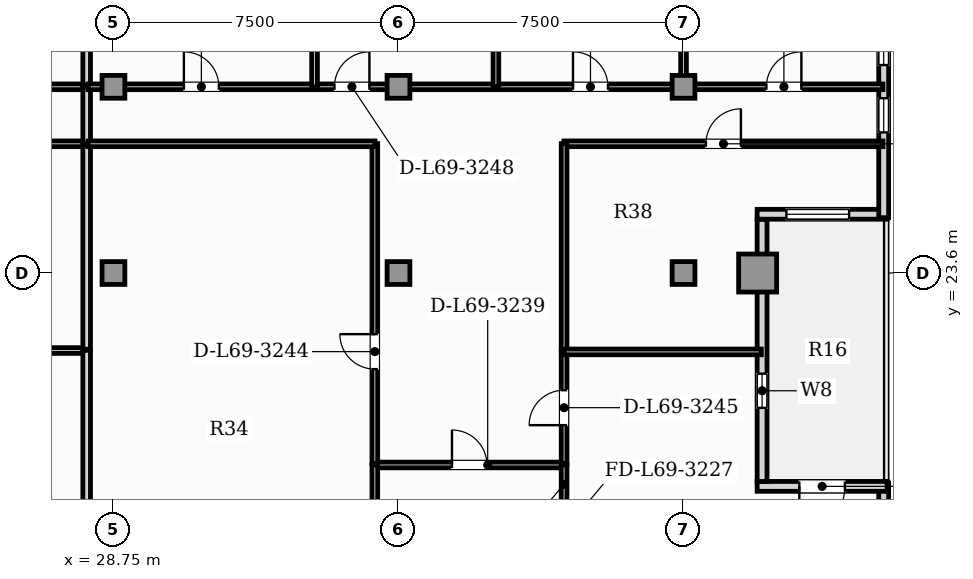
"""IFC4 building model, lengths in metres.
Left out: names, types, materials, properties, quantities, classifications, styles, units other than length and angle.
Written with IfcOpenShell. Run it as: python <this file> out.ifc"""

import sys

from ifc_helpers import new_model, si_unit, direction, frame, frame_2d, origin, origin_2d, place, context, subcontext, project, spatial, rectangle, hollow_rectangle, extrude, element, fill, save


model = new_model("IFC4")
c1 = context("Model", 3, precision=1e-05, world=origin(), true_north=direction((0.0, 1.0)))
c2 = subcontext(c1, "Body", "Model", "MODEL_VIEW")
j1 = project(units=[si_unit("LENGTHUNIT", "METRE"), si_unit("PLANEANGLEUNIT", "RADIAN")], contexts=[c1])
p1 = place(None, origin())
s1 = spatial("IfcSite", under=j1, at=p1, CompositionType="ELEMENT")
p2 = place(p1, origin())
s2 = spatial("IfcBuilding", under=s1, at=p2, CompositionType="ELEMENT")
p3 = place(p2, frame((0.0, 0.0, 281.05)))
s3 = spatial("IfcBuildingStorey", under=s2, at=p3, CompositionType="ELEMENT", Elevation=281.05)
p4 = place(p3, frame((45.7, 23.6, 0.0), z_axis=(0.0, 0.0, 1.0), x_axis=(1.0, 0.0, 0.0)))
e1 = element("IfcColumn", 1, at=p4, inside=s3, PredefinedType="USERDEFINED", context=c2, shape_type="SweptSolid", body=[
    extrude(hollow_rectangle(XDim=1.0, YDim=1.0, WallThickness=0.06, at=origin_2d()), origin(), (0.0, 0.0, 1.0), 3.85),
])
for number, where, z_axis, x_axis in (
    (2, (28.75, 23.6, 0.0), (0.0, 0.0, 1.0), (1.0, 0.0, 0.0)),
    (3, (36.25, 23.6, 0.0), (0.0, 0.0, 1.0), (1.0, 0.0, 0.0)),
    (4, (43.75, 23.6, 0.0), (0.0, 0.0, 1.0), (1.0, 0.0, 0.0)),
    (5, (28.75, 28.5, 0.0), (0.0, 0.0, 1.0), (1.0, 0.0, 0.0)),
    (6, (36.25, 28.5, 0.0), (0.0, 0.0, 1.0), (1.0, 0.0, 0.0)),
    (7, (43.75, 28.5, 0.0), (0.0, 0.0, 1.0), (1.0, 0.0, 0.0)),
):
    element("IfcColumn", number, at=place(p3, frame(where, z_axis=z_axis, x_axis=x_axis)), inside=s3, PredefinedType="COLUMN", context=c2, shape_type="SweptSolid", body=[
        extrude(rectangle(XDim=0.6, YDim=0.6, at=origin_2d()), origin(), (0.0, 0.0, 1.0), 3.85),
    ])
p5 = place(p3, frame((49.017, 3.24, 0.0), z_axis=(0.0, 0.0, 1.0), x_axis=(0.0, 1.0, 0.0)))
e8 = element("IfcWall", 8, at=p5, inside=s3, PredefinedType="SOLIDWALL", context=c2, shape_type="SweptSolid", body=[
    extrude(rectangle(XDim=14.836, YDim=0.26, at=frame_2d((7.418, 0.0))), origin(), (0.0, 0.0, 1.0), 3.65),
])
p6 = place(p3, frame((49.107, 17.986, 0.0), z_axis=(0.0, 0.0, 1.0), x_axis=(-1.0, 0.0, 0.0)))
e9 = element("IfcWall", 9, at=p6, inside=s3, PredefinedType="SOLIDWALL", context=c2, shape_type="SweptSolid", body=[
    extrude(rectangle(XDim=3.42, YDim=0.26, at=frame_2d((1.71, 0.0))), origin(), (0.0, 0.0, 1.0), 3.65),
])
p7 = place(p6, frame((1.11, 0.0, 0.0)))
e10 = element("IfcOpeningElement", 10, at=p7, cuts=e9, PredefinedType="OPENING", context=c2, shape_type="SweptSolid", body=[
    extrude(rectangle(XDim=1.2, YDim=2.2, at=frame_2d((0.6, 1.1))), frame((0.0, 0.14, 0.0), z_axis=(0.0, -1.0, 0.0), x_axis=(1.0, 0.0, 0.0)), (0.0, 0.0, 1.0), 0.28),
])
p8 = place(p3, frame((45.817, 18.116, 0.0), z_axis=(0.0, 0.0, 1.0), x_axis=(0.0, 1.0, 0.0)))
e11 = element("IfcWall", 11, at=p8, inside=s3, PredefinedType="SOLIDWALL", context=c2, shape_type="SweptSolid", body=[
    extrude(rectangle(XDim=6.9, YDim=0.26, at=frame_2d((3.45, 0.0))), origin(), (0.0, 0.0, 1.0), 3.19),
])
p9 = place(p8, frame((1.936, 0.0, 0.85)))
e12 = element("IfcOpeningElement", 12, at=p9, cuts=e11, PredefinedType="OPENING", context=c2, shape_type="SweptSolid", body=[
    extrude(rectangle(XDim=0.9, YDim=1.4, at=frame_2d((0.45, 0.7))), frame((0.0, 0.14, 0.0), z_axis=(0.0, -1.0, 0.0), x_axis=(1.0, 0.0, 0.0)), (0.0, 0.0, 1.0), 0.28),
])
p10 = place(p3, frame((45.687, 25.146, 0.0), z_axis=(0.0, 0.0, 1.0), x_axis=(1.0, 0.0, 0.0)))
e13 = element("IfcWall", 13, at=p10, inside=s3, PredefinedType="SOLIDWALL", context=c2, shape_type="SweptSolid", body=[
    extrude(rectangle(XDim=3.42, YDim=0.26, at=frame_2d((1.71, 0.0))), origin(), (0.0, 0.0, 1.0), 3.65),
])
p11 = place(p10, frame((0.77, 0.0, 0.88)))
e14 = element("IfcOpeningElement", 14, at=p11, cuts=e13, PredefinedType="OPENING", context=c2, shape_type="SweptSolid", body=[
    extrude(rectangle(XDim=1.65, YDim=2.0, at=frame_2d((0.825, 1.0))), frame((0.0, 0.14, 0.0), z_axis=(0.0, -1.0, 0.0), x_axis=(1.0, 0.0, 0.0)), (0.0, 0.0, 1.0), 0.28),
])
p12 = place(p3, frame((49.017, 25.056, 0.0), z_axis=(0.0, 0.0, 1.0), x_axis=(0.0, 1.0, 0.0)))
e15 = element("IfcWall", 15, at=p12, inside=s3, PredefinedType="SOLIDWALL", context=c2, shape_type="SweptSolid", body=[
    extrude(rectangle(XDim=6.436, YDim=0.26, at=frame_2d((3.218, 0.0))), origin(), (0.0, 0.0, 1.0), 3.65),
])
p13 = place(p12, frame((2.244, 0.0, 0.95)))
e16 = element("IfcOpeningElement", 16, at=p13, cuts=e15, PredefinedType="OPENING", context=c2, shape_type="SweptSolid", body=[
    extrude(rectangle(XDim=0.9, YDim=1.5, at=frame_2d((0.45, 0.75))), frame((0.0, 0.14, 0.0), z_axis=(0.0, -1.0, 0.0), x_axis=(1.0, 0.0, 0.0)), (0.0, 0.0, 1.0), 0.28),
])
p14 = place(p12, frame((4.016, 0.0, 0.88)))
e17 = element("IfcOpeningElement", 17, at=p14, cuts=e15, PredefinedType="OPENING", context=c2, shape_type="SweptSolid", body=[
    extrude(rectangle(XDim=1.65, YDim=2.0, at=frame_2d((0.825, 1.0))), frame((0.0, 0.14, 0.0), z_axis=(0.0, -1.0, 0.0), x_axis=(1.0, 0.0, 0.0)), (0.0, 0.0, 1.0), 0.28),
])
p15 = place(p3, frame((21.079, 27.0, 0.0), z_axis=(0.0, 0.0, 1.0), x_axis=(1.0, 0.0, 0.0)))
e18 = element("IfcWall", 18, at=p15, inside=s3, PredefinedType="PARTITIONING", context=c2, shape_type="SweptSolid", body=[
    extrude(rectangle(XDim=6.971, YDim=0.15, at=frame_2d((3.485, 0.0))), origin(), (0.0, 0.0, 1.0), 3.65),
])
p16 = place(p15, frame((3.025, 0.0, 0.0)))
e19 = element("IfcOpeningElement", 19, at=p16, cuts=e18, PredefinedType="OPENING", context=c2, shape_type="SweptSolid", body=[
    extrude(rectangle(XDim=0.92, YDim=2.1, at=frame_2d((0.46, 1.05))), frame((0.0, 0.085, 0.0), z_axis=(0.0, -1.0, 0.0), x_axis=(1.0, 0.0, 0.0)), (0.0, 0.0, 1.0), 0.17),
])
p17 = place(p3, frame((22.545, 28.5, 0.0), z_axis=(0.0, 0.0, 1.0), x_axis=(1.0, 0.0, 0.0)))
e20 = element("IfcWall", 20, at=p17, inside=s3, PredefinedType="PARTITIONING", context=c2, shape_type="SweptSolid", body=[
    extrude(rectangle(XDim=5.506, YDim=0.15, at=frame_2d((2.753, 0.0))), origin(), (0.0, 0.0, 1.0), 3.117),
])
p18 = place(p17, frame((2.293, 0.0, 0.0)))
e21 = element("IfcOpeningElement", 21, at=p18, cuts=e20, PredefinedType="OPENING", context=c2, shape_type="SweptSolid", body=[
    extrude(rectangle(XDim=0.92, YDim=2.1, at=frame_2d((0.46, 1.05))), frame((0.0, 0.085, 0.0), z_axis=(0.0, -1.0, 0.0), x_axis=(1.0, 0.0, 0.0)), (0.0, 0.0, 1.0), 0.17),
])
p19 = place(p3, frame((28.045, 26.995, 0.0), z_axis=(0.0, 0.0, 1.0), x_axis=(0.0, 1.0, 0.0)))
e22 = element("IfcWall", 22, at=p19, inside=s3, PredefinedType="PARTITIONING", context=c2, shape_type="SweptSolid", body=[
    extrude(rectangle(XDim=1.51, YDim=0.2, at=frame_2d((0.755, 0.0))), origin(), (0.0, 0.0, 1.0), 3.65),
])
p20 = place(p3, frame((21.079, 21.561, 0.0), z_axis=(0.0, 0.0, 1.0), x_axis=(1.0, 0.0, 0.0)))
e23 = element("IfcWall", 23, at=p20, inside=s3, PredefinedType="PARTITIONING", context=c2, shape_type="SweptSolid", body=[
    extrude(rectangle(XDim=6.971, YDim=0.15, at=frame_2d((3.485, 0.0))), origin(), (0.0, 0.0, 1.0), 3.65),
])
p21 = place(p3, frame((28.045, 17.525, 0.0), z_axis=(0.0, 0.0, 1.0), x_axis=(0.0, 1.0, 0.0)))
e24 = element("IfcWall", 24, at=p21, inside=s3, PredefinedType="PARTITIONING", context=c2, shape_type="SweptSolid", body=[
    extrude(rectangle(XDim=4.041, YDim=0.2, at=frame_2d((2.021, 0.0))), origin(), (0.0, 0.0, 1.0), 3.65),
])
p22 = place(p3, frame((28.045, 21.596, 0.0), z_axis=(0.0, 0.0, 1.0), x_axis=(0.0, 1.0, 0.0)))
e25 = element("IfcWall", 25, at=p22, inside=s3, PredefinedType="PARTITIONING", context=c2, shape_type="SweptSolid", body=[
    extrude(rectangle(XDim=5.369, YDim=0.2, at=frame_2d((2.685, 0.0))), origin(), (0.0, 0.0, 1.0), 3.65),
])
p23 = place(p3, frame((28.045, 28.535, 0.0), z_axis=(0.0, 0.0, 1.0), x_axis=(0.0, 1.0, 0.0)))
e26 = element("IfcWall", 26, at=p23, inside=s3, PredefinedType="PARTITIONING", context=c2, shape_type="SweptSolid", body=[
    extrude(rectangle(XDim=6.048, YDim=0.2, at=frame_2d((3.024, 0.0))), origin(), (0.0, 0.0, 1.0), 3.65),
])
p24 = place(p3, frame((35.622, 18.55, 0.0), z_axis=(0.0, 0.0, 1.0), x_axis=(1.0, 0.0, 0.0)))
e27 = element("IfcWall", 27, at=p24, inside=s3, PredefinedType="PARTITIONING", context=c2, shape_type="SweptSolid", body=[
    extrude(rectangle(XDim=4.99, YDim=0.15, at=frame_2d((2.495, 0.0))), origin(), (0.0, 0.0, 1.0), 3.65),
])
p25 = place(p24, frame((2.035, 0.0, 0.0)))
e28 = element("IfcOpeningElement", 28, at=p25, cuts=e27, PredefinedType="OPENING", context=c2, shape_type="SweptSolid", body=[
    extrude(rectangle(XDim=0.92, YDim=2.1, at=frame_2d((0.46, 1.05))), frame((0.0, 0.085, 0.0), z_axis=(0.0, -1.0, 0.0), x_axis=(1.0, 0.0, 0.0)), (0.0, 0.0, 1.0), 0.17),
])
p26 = place(p3, frame((35.627, 15.695, 0.0), z_axis=(0.0, 0.0, 1.0), x_axis=(0.0, 1.0, 0.0)))
e29 = element("IfcWall", 29, at=p26, inside=s3, PredefinedType="PARTITIONING", context=c2, shape_type="SweptSolid", body=[
    extrude(rectangle(XDim=2.859, YDim=0.15, at=frame_2d((1.43, 0.0))), origin(), (0.0, 0.0, 1.0), 3.65),
])
p27 = place(p26, frame((0.97, 0.0, 0.0)))
e30 = element("IfcOpeningElement", 30, at=p27, cuts=e29, PredefinedType="OPENING", context=c2, shape_type="SweptSolid", body=[
    extrude(rectangle(XDim=0.92, YDim=2.1, at=frame_2d((0.46, 1.05))), frame((0.0, 0.085, 0.0), z_axis=(0.0, -1.0, 0.0), x_axis=(1.0, 0.0, 0.0)), (0.0, 0.0, 1.0), 0.17),
])
p28 = place(p3, frame((40.607, 17.525, 0.0), z_axis=(0.0, 0.0, 1.0), x_axis=(0.0, 1.0, 0.0)))
e31 = element("IfcWall", 31, at=p28, inside=s3, PredefinedType="PARTITIONING", context=c2, shape_type="SweptSolid", body=[
    extrude(rectangle(XDim=1.03, YDim=0.15, at=frame_2d((0.515, 0.0))), origin(), (0.0, 0.0, 1.0), 3.65),
])
p29 = place(p3, frame((35.627, 18.584, 0.0), z_axis=(0.0, 0.0, 1.0), x_axis=(0.0, 1.0, 0.0)))
e32 = element("IfcWall", 32, at=p29, inside=s3, PredefinedType="PARTITIONING", context=c2, shape_type="SweptSolid", body=[
    extrude(rectangle(XDim=8.42, YDim=0.15, at=frame_2d((4.21, 0.0))), origin(), (0.0, 0.0, 1.0), 3.65),
])
p30 = place(p29, frame((2.487, 0.0, 0.0)))
e33 = element("IfcOpeningElement", 33, at=p30, cuts=e32, PredefinedType="OPENING", context=c2, shape_type="SweptSolid", body=[
    extrude(rectangle(XDim=0.92, YDim=2.1, at=frame_2d((0.46, 1.05))), frame((0.0, 0.085, 0.0), z_axis=(0.0, -1.0, 0.0), x_axis=(1.0, 0.0, 0.0)), (0.0, 0.0, 1.0), 0.17),
])
p31 = place(p3, frame((28.08, 27.0, 0.0), z_axis=(0.0, 0.0, 1.0), x_axis=(1.0, 0.0, 0.0)))
e34 = element("IfcWall", 34, at=p31, inside=s3, PredefinedType="PARTITIONING", context=c2, shape_type="SweptSolid", body=[
    extrude(rectangle(XDim=7.552, YDim=0.15, at=frame_2d((3.776, 0.0))), origin(), (0.0, 0.0, 1.0), 3.65),
])
p32 = place(p3, frame((40.607, 18.584, 0.0), z_axis=(0.0, 0.0, 1.0), x_axis=(0.0, 1.0, 0.0)))
e35 = element("IfcWall", 35, at=p32, inside=s3, PredefinedType="PARTITIONING", context=c2, shape_type="SweptSolid", body=[
    extrude(rectangle(XDim=2.945, YDim=0.15, at=frame_2d((1.473, 0.0))), origin(), (0.0, 0.0, 1.0), 3.65),
])
p33 = place(p32, frame((1.012, 0.0, 0.0)))
e36 = element("IfcOpeningElement", 36, at=p33, cuts=e35, PredefinedType="OPENING", context=c2, shape_type="SweptSolid", body=[
    extrude(rectangle(XDim=0.92, YDim=2.1, at=frame_2d((0.46, 1.05))), frame((0.0, 0.085, 0.0), z_axis=(0.0, -1.0, 0.0), x_axis=(1.0, 0.0, 0.0)), (0.0, 0.0, 1.0), 0.17),
])
p34 = place(p3, frame((40.602, 27.0, 0.0), z_axis=(0.0, 0.0, 1.0), x_axis=(1.0, 0.0, 0.0)))
e37 = element("IfcWall", 37, at=p34, inside=s3, PredefinedType="PARTITIONING", context=c2, shape_type="SweptSolid", body=[
    extrude(rectangle(XDim=8.395, YDim=0.15, at=frame_2d((4.198, 0.0))), origin(), (0.0, 0.0, 1.0), 3.65),
])
p35 = place(p34, frame((3.738, 0.0, 0.0)))
e38 = element("IfcOpeningElement", 38, at=p35, cuts=e37, PredefinedType="OPENING", context=c2, shape_type="SweptSolid", body=[
    extrude(rectangle(XDim=0.92, YDim=2.1, at=frame_2d((0.46, 1.05))), frame((0.0, 0.085, 0.0), z_axis=(0.0, -1.0, 0.0), x_axis=(1.0, 0.0, 0.0)), (0.0, 0.0, 1.0), 0.17),
])
p36 = place(p3, frame((40.607, 21.56, 0.0), z_axis=(0.0, 0.0, 1.0), x_axis=(0.0, 1.0, 0.0)))
e39 = element("IfcWall", 39, at=p36, inside=s3, PredefinedType="PARTITIONING", context=c2, shape_type="SweptSolid", body=[
    extrude(rectangle(XDim=5.445, YDim=0.15, at=frame_2d((2.723, 0.0))), origin(), (0.0, 0.0, 1.0), 3.65),
])
p37 = place(p3, frame((28.08, 28.5, 0.0), z_axis=(0.0, 0.0, 1.0), x_axis=(1.0, 0.0, 0.0)))
e40 = element("IfcWall", 40, at=p37, inside=s3, PredefinedType="PARTITIONING", context=c2, shape_type="SweptSolid", body=[
    extrude(rectangle(XDim=5.966, YDim=0.15, at=frame_2d((2.983, 0.0))), origin(), (0.0, 0.0, 1.0), 3.117),
])
p38 = place(p37, frame((2.523, 0.0, 0.0)))
e41 = element("IfcOpeningElement", 41, at=p38, cuts=e40, PredefinedType="OPENING", context=c2, shape_type="SweptSolid", body=[
    extrude(rectangle(XDim=0.92, YDim=2.1, at=frame_2d((0.46, 1.05))), frame((0.0, 0.085, 0.0), z_axis=(0.0, -1.0, 0.0), x_axis=(1.0, 0.0, 0.0)), (0.0, 0.0, 1.0), 0.17),
])
p39 = place(p3, frame((34.077, 28.5, 0.0), z_axis=(0.0, 0.0, 1.0), x_axis=(1.0, 0.0, 0.0)))
e42 = element("IfcWall", 42, at=p39, inside=s3, PredefinedType="PARTITIONING", context=c2, shape_type="SweptSolid", body=[
    extrude(rectangle(XDim=4.742, YDim=0.15, at=frame_2d((2.371, 0.0))), origin(), (0.0, 0.0, 1.0), 3.117),
])
p40 = place(p39, frame((0.488, 0.0, 0.0)))
e43 = element("IfcOpeningElement", 43, at=p40, cuts=e42, PredefinedType="OPENING", context=c2, shape_type="SweptSolid", body=[
    extrude(rectangle(XDim=0.92, YDim=2.1, at=frame_2d((0.46, 1.05))), frame((0.0, 0.085, 0.0), z_axis=(0.0, -1.0, 0.0), x_axis=(1.0, 0.0, 0.0)), (0.0, 0.0, 1.0), 0.17),
])
p41 = place(p3, frame((38.848, 28.5, 0.0), z_axis=(0.0, 0.0, 1.0), x_axis=(1.0, 0.0, 0.0)))
e44 = element("IfcWall", 44, at=p41, inside=s3, PredefinedType="PARTITIONING", context=c2, shape_type="SweptSolid", body=[
    extrude(rectangle(XDim=4.906, YDim=0.15, at=frame_2d((2.453, 0.0))), origin(), (0.0, 0.0, 1.0), 3.117),
])
p42 = place(p41, frame((1.993, 0.0, 0.0)))
e45 = element("IfcOpeningElement", 45, at=p42, cuts=e44, PredefinedType="OPENING", context=c2, shape_type="SweptSolid", body=[
    extrude(rectangle(XDim=0.92, YDim=2.1, at=frame_2d((0.46, 1.05))), frame((0.0, 0.085, 0.0), z_axis=(0.0, -1.0, 0.0), x_axis=(1.0, 0.0, 0.0)), (0.0, 0.0, 1.0), 0.17),
])
p43 = place(p3, frame((43.785, 28.5, 0.0), z_axis=(0.0, 0.0, 1.0), x_axis=(1.0, 0.0, 0.0)))
e46 = element("IfcWall", 46, at=p43, inside=s3, PredefinedType="PARTITIONING", context=c2, shape_type="SweptSolid", body=[
    extrude(rectangle(XDim=5.212, YDim=0.15, at=frame_2d((2.606, 0.0))), origin(), (0.0, 0.0, 1.0), 3.65),
])
p44 = place(p43, frame((2.146, 0.0, 0.0)))
e47 = element("IfcOpeningElement", 47, at=p44, cuts=e46, PredefinedType="OPENING", context=c2, shape_type="SweptSolid", body=[
    extrude(rectangle(XDim=0.92, YDim=2.1, at=frame_2d((0.46, 1.05))), frame((0.0, 0.085, 0.0), z_axis=(0.0, -1.0, 0.0), x_axis=(1.0, 0.0, 0.0)), (0.0, 0.0, 1.0), 0.17),
])
p45 = place(p3, frame((40.602, 21.525, 0.0), z_axis=(0.0, 0.0, 1.0), x_axis=(1.0, 0.0, 0.0)))
e48 = element("IfcWall", 48, at=p45, inside=s3, PredefinedType="PARTITIONING", context=c2, shape_type="SweptSolid", body=[
    extrude(rectangle(XDim=5.195, YDim=0.15, at=frame_2d((2.598, 0.0))), origin(), (0.0, 0.0, 1.0), 3.65),
])
for number, where, z_axis, x_axis in (
    (49, (34.042, 28.495, 0.0), (0.0, 0.0, 1.0), (0.0, 1.0, 0.0)),
    (50, (38.813, 28.495, 0.0), (0.0, 0.0, 1.0), (0.0, 1.0, 0.0)),
    (51, (43.75, 28.495, 0.0), (0.0, 0.0, 1.0), (0.0, 1.0, 0.0)),
):
    element("IfcWall", number, at=place(p3, frame(where, z_axis=z_axis, x_axis=x_axis)), inside=s3, PredefinedType="PARTITIONING", context=c2, shape_type="SweptSolid", body=[
        extrude(rectangle(XDim=6.088, YDim=0.15, at=frame_2d((3.044, 0.0))), origin(), (0.0, 0.0, 1.0), 3.65),
    ])
p46 = place(p7, frame((1.2, 0.0, 0.0), z_axis=(0.0, 0.0, 1.0), x_axis=(-1.0, 0.0, 0.0)))
e52 = element("IfcDoor", 52, at=p46, inside=s3, OperationType="SINGLE_SWING_LEFT", PredefinedType="DOOR", context=c2, shape_type="SweptSolid", body=[
    extrude(rectangle(XDim=1.2, YDim=2.2, at=frame_2d((0.6, 1.1))), frame((0.0, 0.025, 0.0), z_axis=(0.0, -1.0, 0.0), x_axis=(1.0, 0.0, 0.0)), (0.0, 0.0, 1.0), 0.05),
])
fill(e10, e52)
p47 = place(p13, origin())
e53 = element("IfcWindow", 53, at=p47, inside=s3, PartitioningType="SINGLE_PANEL", PredefinedType="WINDOW", context=c2, shape_type="SweptSolid", body=[
    extrude(rectangle(XDim=0.9, YDim=1.5, at=frame_2d((0.45, 0.75))), frame((0.0, 0.03, 0.0), z_axis=(0.0, -1.0, 0.0), x_axis=(1.0, 0.0, 0.0)), (0.0, 0.0, 1.0), 0.06),
])
fill(e16, e53)
p48 = place(p9, origin())
e54 = element("IfcWindow", 54, at=p48, inside=s3, PartitioningType="SINGLE_PANEL", PredefinedType="WINDOW", context=c2, shape_type="SweptSolid", body=[
    extrude(rectangle(XDim=0.9, YDim=1.4, at=frame_2d((0.45, 0.7))), frame((0.0, 0.03, 0.0), z_axis=(0.0, -1.0, 0.0), x_axis=(1.0, 0.0, 0.0)), (0.0, 0.0, 1.0), 0.06),
])
fill(e12, e54)
p49 = place(p11, origin())
e55 = element("IfcWindow", 55, at=p49, inside=s3, PartitioningType="SINGLE_PANEL", PredefinedType="WINDOW", context=c2, shape_type="SweptSolid", body=[
    extrude(rectangle(XDim=1.65, YDim=2.0, at=frame_2d((0.825, 1.0))), frame((0.0, 0.03, 0.0), z_axis=(0.0, -1.0, 0.0), x_axis=(1.0, 0.0, 0.0)), (0.0, 0.0, 1.0), 0.06),
])
fill(e14, e55)
p50 = place(p14, origin())
e56 = element("IfcWindow", 56, at=p50, inside=s3, PartitioningType="SINGLE_PANEL", PredefinedType="WINDOW", context=c2, shape_type="SweptSolid", body=[
    extrude(rectangle(XDim=1.65, YDim=2.0, at=frame_2d((0.825, 1.0))), frame((0.0, 0.03, 0.0), z_axis=(0.0, -1.0, 0.0), x_axis=(1.0, 0.0, 0.0)), (0.0, 0.0, 1.0), 0.06),
])
fill(e17, e56)
p51 = place(p25, origin())
e57 = element("IfcDoor", 57, at=p51, inside=s3, OperationType="SINGLE_SWING_LEFT", PredefinedType="DOOR", context=c2, shape_type="SweptSolid", body=[
    extrude(rectangle(XDim=0.92, YDim=2.1, at=frame_2d((0.46, 1.05))), frame((0.0, 0.025, 0.0), z_axis=(0.0, -1.0, 0.0), x_axis=(1.0, 0.0, 0.0)), (0.0, 0.0, 1.0), 0.05),
])
fill(e28, e57)
p52 = place(p30, origin())
e58 = element("IfcDoor", 58, at=p52, inside=s3, OperationType="SINGLE_SWING_RIGHT", PredefinedType="DOOR", context=c2, shape_type="SweptSolid", body=[
    extrude(rectangle(XDim=0.92, YDim=2.1, at=frame_2d((0.46, 1.05))), frame((0.0, 0.025, 0.0), z_axis=(0.0, -1.0, 0.0), x_axis=(1.0, 0.0, 0.0)), (0.0, 0.0, 1.0), 0.05),
])
fill(e33, e58)
p53 = place(p33, origin())
e59 = element("IfcDoor", 59, at=p53, inside=s3, OperationType="SINGLE_SWING_LEFT", PredefinedType="DOOR", context=c2, shape_type="SweptSolid", body=[
    extrude(rectangle(XDim=0.92, YDim=2.1, at=frame_2d((0.46, 1.05))), frame((0.0, 0.025, 0.0), z_axis=(0.0, -1.0, 0.0), x_axis=(1.0, 0.0, 0.0)), (0.0, 0.0, 1.0), 0.05),
])
fill(e36, e59)
p54 = place(p35, origin())
e60 = element("IfcDoor", 60, at=p54, inside=s3, OperationType="SINGLE_SWING_RIGHT", PredefinedType="DOOR", context=c2, shape_type="SweptSolid", body=[
    extrude(rectangle(XDim=0.92, YDim=2.1, at=frame_2d((0.46, 1.05))), frame((0.0, 0.025, 0.0), z_axis=(0.0, -1.0, 0.0), x_axis=(1.0, 0.0, 0.0)), (0.0, 0.0, 1.0), 0.05),
])
fill(e38, e60)
p55 = place(p38, origin())
e61 = element("IfcDoor", 61, at=p55, inside=s3, OperationType="SINGLE_SWING_LEFT", PredefinedType="DOOR", context=c2, shape_type="SweptSolid", body=[
    extrude(rectangle(XDim=0.92, YDim=2.1, at=frame_2d((0.46, 1.05))), frame((0.0, 0.025, 0.0), z_axis=(0.0, -1.0, 0.0), x_axis=(1.0, 0.0, 0.0)), (0.0, 0.0, 1.0), 0.05),
])
fill(e41, e61)
p56 = place(p40, origin())
e62 = element("IfcDoor", 62, at=p56, inside=s3, OperationType="SINGLE_SWING_RIGHT", PredefinedType="DOOR", context=c2, shape_type="SweptSolid", body=[
    extrude(rectangle(XDim=0.92, YDim=2.1, at=frame_2d((0.46, 1.05))), frame((0.0, 0.025, 0.0), z_axis=(0.0, -1.0, 0.0), x_axis=(1.0, 0.0, 0.0)), (0.0, 0.0, 1.0), 0.05),
])
fill(e43, e62)
p57 = place(p42, origin())
e63 = element("IfcDoor", 63, at=p57, inside=s3, OperationType="SINGLE_SWING_LEFT", PredefinedType="DOOR", context=c2, shape_type="SweptSolid", body=[
    extrude(rectangle(XDim=0.92, YDim=2.1, at=frame_2d((0.46, 1.05))), frame((0.0, 0.025, 0.0), z_axis=(0.0, -1.0, 0.0), x_axis=(1.0, 0.0, 0.0)), (0.0, 0.0, 1.0), 0.05),
])
fill(e45, e63)
p58 = place(p44, origin())
e64 = element("IfcDoor", 64, at=p58, inside=s3, OperationType="SINGLE_SWING_RIGHT", PredefinedType="DOOR", context=c2, shape_type="SweptSolid", body=[
    extrude(rectangle(XDim=0.92, YDim=2.1, at=frame_2d((0.46, 1.05))), frame((0.0, 0.025, 0.0), z_axis=(0.0, -1.0, 0.0), x_axis=(1.0, 0.0, 0.0)), (0.0, 0.0, 1.0), 0.05),
])
fill(e47, e64)
save(model, sys.argv[1])
